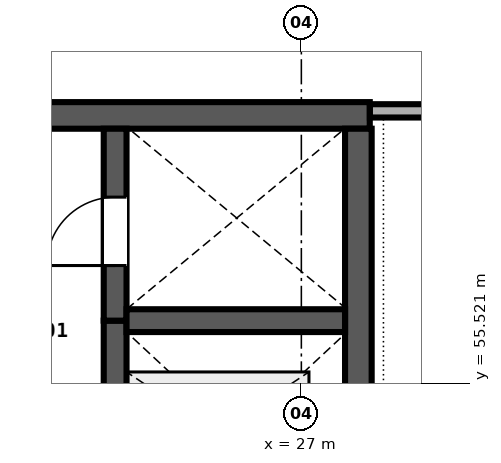
"""IFC4 building model, lengths in metres.
Left out: names, types, materials, properties, quantities, classifications, styles, units other than length and angle.
Written with IfcOpenShell. Run it as: python <this file> out.ifc"""

import sys

from ifc_helpers import new_model, si_unit, direction, frame, frame_2d, origin, place, context, subcontext, project, spatial, rectangle, extrude, element, fill, save


model = new_model("IFC4")
c1 = context("Model", 3, precision=1e-05, world=origin(), true_north=direction((0.0, 1.0)))
c2 = subcontext(c1, "Body", "Model", "MODEL_VIEW")
j1 = project(units=[si_unit("LENGTHUNIT", "METRE"), si_unit("PLANEANGLEUNIT", "RADIAN")], contexts=[c1])
p1 = place(None, origin())
s1 = spatial("IfcSite", under=j1, at=p1, CompositionType="ELEMENT")
p2 = place(p1, origin())
s2 = spatial("IfcBuilding", under=s1, at=p2, CompositionType="ELEMENT")
p3 = place(p2, frame((0.0, 0.0, 9.6)))
s3 = spatial("IfcBuildingStorey", under=s2, at=p3, CompositionType="ELEMENT", Elevation=9.6)
p4 = place(p3, frame((27.9, 59.05, 0.0), z_axis=(0.0, 0.0, 1.0), x_axis=(-1.0, 0.0, 0.0)))
e1 = element("IfcWall", 1, at=p4, inside=s3, PredefinedType="SHEAR", context=c2, shape_type="SweptSolid", body=[
    extrude(rectangle(XDim=18.0, YDim=0.35, at=frame_2d((9.0, 0.0))), origin(), (0.0, 0.0, 1.0), 4.5),
])
p5 = place(p4, frame((4.7, 0.0, 0.0)))
e2 = element("IfcOpeningElement", 2, at=p5, cuts=e1, PredefinedType="OPENING", context=c2, shape_type="SweptSolid", body=[
    extrude(rectangle(XDim=1.9, YDim=2.25, at=frame_2d((0.95, 1.125))), frame((0.0, 0.185, 0.0), z_axis=(0.0, -1.0, 0.0), x_axis=(1.0, 0.0, 0.0)), (0.0, 0.0, 1.0), 0.37),
])
p6 = place(p3, frame((27.75, 53.525, 0.0), z_axis=(0.0, 0.0, 1.0), x_axis=(0.0, 1.0, 0.0)))
e3 = element("IfcWall", 3, at=p6, inside=s3, PredefinedType="SHEAR", context=c2, shape_type="SweptSolid", body=[
    extrude(rectangle(XDim=5.35, YDim=0.35, at=frame_2d((2.675, 0.0))), origin(), (0.0, 0.0, 1.0), 4.5),
])
p7 = place(p3, frame((24.55, 53.525, 0.0), z_axis=(0.0, 0.0, 1.0), x_axis=(0.0, 1.0, 0.0)))
e4 = element("IfcWall", 4, at=p7, inside=s3, PredefinedType="SHEAR", context=c2, shape_type="SweptSolid", body=[
    extrude(rectangle(XDim=2.825, YDim=0.3, at=frame_2d((1.413, 0.0))), origin(), (0.0, 0.0, 1.0), 4.5),
])
p8 = place(p7, frame((0.775, 0.0, 0.0)))
e5 = element("IfcOpeningElement", 5, at=p8, cuts=e4, PredefinedType="OPENING", context=c2, shape_type="SweptSolid", body=[
    extrude(rectangle(XDim=1.1, YDim=2.1, at=frame_2d((0.55, 1.05))), frame((0.0, 0.16, 0.0), z_axis=(0.0, -1.0, 0.0), x_axis=(1.0, 0.0, 0.0)), (0.0, 0.0, 1.0), 0.32),
])
p9 = place(p3, frame((24.55, 56.35, 0.0), z_axis=(0.0, 0.0, 1.0), x_axis=(0.0, 1.0, 0.0)))
e6 = element("IfcWall", 6, at=p9, inside=s3, PredefinedType="SHEAR", context=c2, shape_type="SweptSolid", body=[
    extrude(rectangle(XDim=2.525, YDim=0.3, at=frame_2d((1.262, 0.0))), origin(), (0.0, 0.0, 1.0), 4.5),
])
p10 = place(p9, frame((0.725, 0.0, 0.0)))
e7 = element("IfcOpeningElement", 7, at=p10, cuts=e6, PredefinedType="OPENING", context=c2, shape_type="SweptSolid", body=[
    extrude(rectangle(XDim=0.9, YDim=2.1, at=frame_2d((0.45, 1.05))), frame((0.0, 0.16, 0.0), z_axis=(0.0, -1.0, 0.0), x_axis=(1.0, 0.0, 0.0)), (0.0, 0.0, 1.0), 0.32),
])
p11 = place(p3, frame((24.7, 56.35, 0.0), z_axis=(0.0, 0.0, 1.0), x_axis=(1.0, 0.0, 0.0)))
e8 = element("IfcWall", 8, at=p11, inside=s3, PredefinedType="SHEAR", context=c2, shape_type="SweptSolid", body=[
    extrude(rectangle(XDim=2.875, YDim=0.3, at=frame_2d((1.438, 0.0))), origin(), (0.0, 0.0, 1.0), 4.5),
])
p12 = place(p3, frame((27.902, 59.11, 0.0), z_axis=(0.0, 0.0, 1.0), x_axis=(1.0, 0.0, 0.0)))
e9 = element("IfcWall", 9, at=p12, inside=s3, PredefinedType="PARTITIONING", context=c2, shape_type="SweptSolid", body=[
    extrude(rectangle(XDim=2.038, YDim=0.175, at=frame_2d((1.019, 0.0))), origin(), (0.0, 0.0, 1.0), 3.56),
])
p13 = place(p10, origin())
e10 = element("IfcDoor", 10, at=p13, inside=s3, OperationType="SINGLE_SWING_LEFT", PredefinedType="DOOR", context=c2, shape_type="SweptSolid", body=[
    extrude(rectangle(XDim=0.9, YDim=2.1, at=frame_2d((0.45, 1.05))), frame((0.0, 0.025, 0.0), z_axis=(0.0, -1.0, 0.0), x_axis=(1.0, 0.0, 0.0)), (0.0, 0.0, 1.0), 0.05),
])
fill(e7, e10)
save(model, sys.argv[1])
